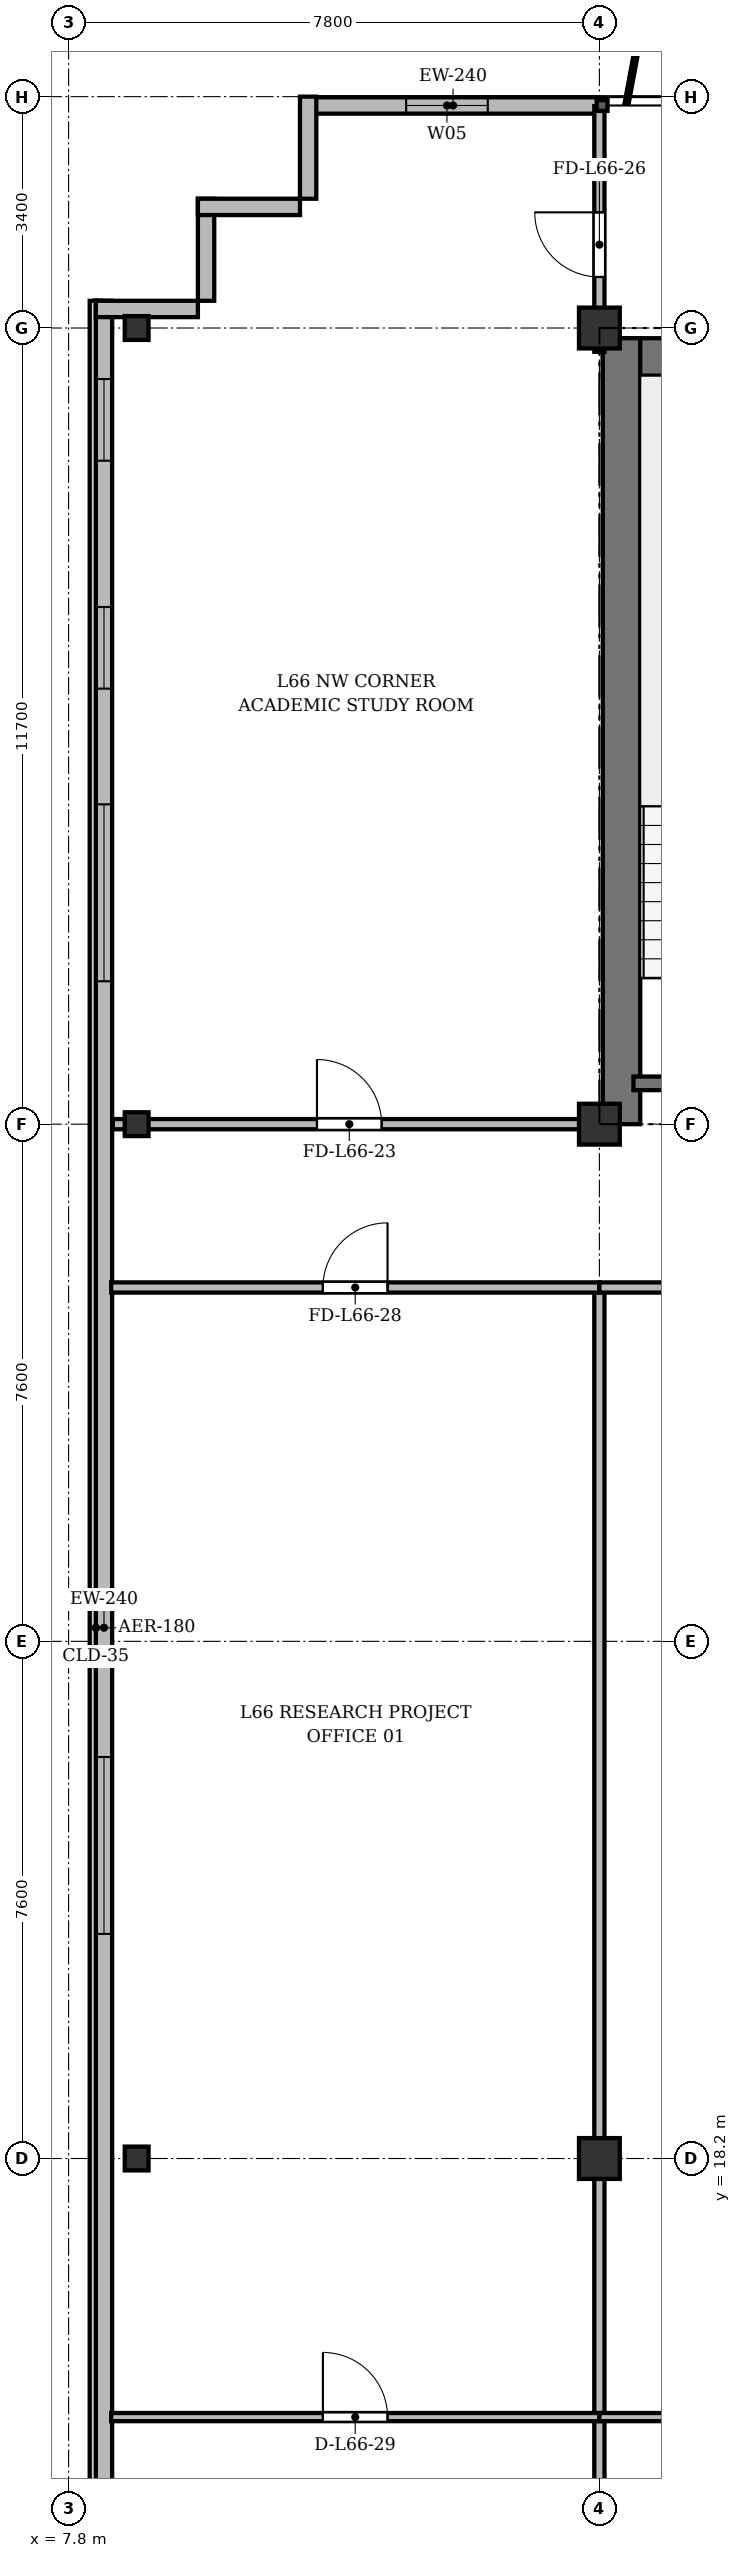
"""IFC4 building model, lengths in metres.
Left out: names, types, materials, properties, quantities, classifications, styles, units other than length and angle.
Written with IfcOpenShell. Run it as: python <this file> out.ifc"""

import sys

from ifc_helpers import new_model, si_unit, direction, frame, frame_2d, origin, origin_2d, place, context, subcontext, project, spatial, rectangle, i_section, extrude, source, transform, mapped, element, fill, save


model = new_model("IFC4")
c1 = context("Model", 3, precision=1e-05, world=origin(), true_north=direction((0.0, 1.0)))
c2 = subcontext(c1, "Body", "Model", "MODEL_VIEW")
j1 = project(units=[si_unit("LENGTHUNIT", "METRE"), si_unit("PLANEANGLEUNIT", "RADIAN")], contexts=[c1])
p1 = place(None, origin())
s1 = spatial("IfcSite", under=j1, at=p1, CompositionType="ELEMENT")
p2 = place(p1, origin())
s2 = spatial("IfcBuilding", under=s1, at=p2, CompositionType="ELEMENT")
p3 = place(p2, frame((0.0, 0.0, 255.9)))
s3 = spatial("IfcBuildingStorey", under=s2, at=p3, CompositionType="ELEMENT", Elevation=255.9)
m1 = source(origin(), c2, "Body", "SweptSolid", [
    extrude(i_section(OverallWidth=0.35, OverallDepth=0.35, WebThickness=0.018, FlangeThickness=0.028, at=origin_2d()), origin(), (0.0, 0.0, 1.0), 3.6),
])
for number, where, z_axis, x_axis in (
    (1, (8.8, 18.2, 0.0), (0.0, 0.0, 1.0), (1.0, 0.0, 0.0)),
    (2, (8.8, 33.4, 0.0), (0.0, 0.0, 1.0), (1.0, 0.0, 0.0)),
    (3, (8.8, 45.1, 0.0), (0.0, 0.0, 1.0), (1.0, 0.0, 0.0)),
):
    element("IfcColumn", number, at=place(p3, frame(where, z_axis=z_axis, x_axis=x_axis)), inside=s3, PredefinedType="COLUMN", context=c2, shape_type="MappedRepresentation", body=[
        mapped(m1, transform((0.0, 0.0, 0.0), x_axis=(1.0, 0.0, 0.0), y_axis=(0.0, 1.0, 0.0), z_axis=(0.0, 0.0, 1.0), scale=1.0)),
    ])
m2 = source(origin(), c2, "Body", "SweptSolid", [
    extrude(rectangle(XDim=0.6, YDim=0.6, at=origin_2d()), origin(), (0.0, 0.0, 1.0), 3.6),
])
for number, where, z_axis, x_axis in (
    (4, (15.6, 18.2, 0.0), (0.0, 0.0, 1.0), (1.0, 0.0, 0.0)),
    (5, (15.6, 33.4, 0.0), (0.0, 0.0, 1.0), (1.0, 0.0, 0.0)),
    (6, (15.6, 45.1, 0.0), (0.0, 0.0, 1.0), (1.0, 0.0, 0.0)),
):
    element("IfcColumn", number, at=place(p3, frame(where, z_axis=z_axis, x_axis=x_axis)), inside=s3, PredefinedType="COLUMN", context=c2, shape_type="MappedRepresentation", body=[
        mapped(m2, transform((0.0, 0.0, 0.0), x_axis=(1.0, 0.0, 0.0), y_axis=(0.0, 1.0, 0.0), z_axis=(0.0, 0.0, 1.0), scale=1.0)),
    ])
p4 = place(p3, frame((11.3, 48.37, 0.0), z_axis=(0.0, 0.0, 1.0), x_axis=(1.0, 0.0, 0.0)))
e7 = element("IfcWall", 7, at=p4, inside=s3, PredefinedType="SOLIDWALL", context=c2, shape_type="SweptSolid", body=[
    extrude(rectangle(XDim=4.3, YDim=0.24, at=frame_2d((2.15, 0.0))), origin(), (0.0, 0.0, 1.0), 3.37),
])
p5 = place(p4, frame((1.46, 0.0, 0.9)))
e8 = element("IfcOpeningElement", 8, at=p5, cuts=e7, PredefinedType="OPENING", context=c2, shape_type="SweptSolid", body=[
    extrude(rectangle(XDim=1.2, YDim=1.65, at=frame_2d((0.6, 0.825))), frame((0.0, 0.13, 0.0), z_axis=(0.0, -1.0, 0.0), x_axis=(1.0, 0.0, 0.0)), (0.0, 0.0, 1.0), 0.26),
])
p6 = place(p3, frame((8.32, 6.5, 0.0), z_axis=(0.0, 0.0, 1.0), x_axis=(0.0, 1.0, 0.0)))
e9 = element("IfcWall", 9, at=p6, inside=s3, PredefinedType="SOLIDWALL", context=c2, shape_type="SweptSolid", body=[
    extrude(rectangle(XDim=39.0, YDim=0.24, at=frame_2d((19.5, 0.0))), origin(), (0.0, 0.0, 1.0), 3.37),
])
p7 = place(p6, frame((1.45, 0.0, 0.92)))
e10 = element("IfcOpeningElement", 10, at=p7, cuts=e9, PredefinedType="OPENING", context=c2, shape_type="SweptSolid", body=[
    extrude(rectangle(XDim=1.2, YDim=1.65, at=frame_2d((0.6, 0.825))), frame((0.0, 0.13, 0.0), z_axis=(0.0, -1.0, 0.0), x_axis=(1.0, 0.0, 0.0)), (0.0, 0.0, 1.0), 0.26),
])
p8 = place(p6, frame((3.6, 0.0, 0.92)))
e11 = element("IfcOpeningElement", 11, at=p8, cuts=e9, PredefinedType="OPENING", context=c2, shape_type="SweptSolid", body=[
    extrude(rectangle(XDim=2.6, YDim=1.9, at=frame_2d((1.3, 0.95))), frame((0.0, 0.13, 0.0), z_axis=(0.0, -1.0, 0.0), x_axis=(1.0, 0.0, 0.0)), (0.0, 0.0, 1.0), 0.26),
])
p9 = place(p6, frame((15.0, 0.0, 0.92)))
e12 = element("IfcOpeningElement", 12, at=p9, cuts=e9, PredefinedType="OPENING", context=c2, shape_type="SweptSolid", body=[
    extrude(rectangle(XDim=2.6, YDim=1.9, at=frame_2d((1.3, 0.95))), frame((0.0, 0.13, 0.0), z_axis=(0.0, -1.0, 0.0), x_axis=(1.0, 0.0, 0.0)), (0.0, 0.0, 1.0), 0.26),
])
p10 = place(p6, frame((29.0, 0.0, 0.92)))
e13 = element("IfcOpeningElement", 13, at=p10, cuts=e9, PredefinedType="OPENING", context=c2, shape_type="SweptSolid", body=[
    extrude(rectangle(XDim=2.6, YDim=1.9, at=frame_2d((1.3, 0.95))), frame((0.0, 0.13, 0.0), z_axis=(0.0, -1.0, 0.0), x_axis=(1.0, 0.0, 0.0)), (0.0, 0.0, 1.0), 0.26),
])
p11 = place(p6, frame((33.3, 0.0, 0.92)))
e14 = element("IfcOpeningElement", 14, at=p11, cuts=e9, PredefinedType="OPENING", context=c2, shape_type="SweptSolid", body=[
    extrude(rectangle(XDim=1.2, YDim=1.65, at=frame_2d((0.6, 0.825))), frame((0.0, 0.13, 0.0), z_axis=(0.0, -1.0, 0.0), x_axis=(1.0, 0.0, 0.0)), (0.0, 0.0, 1.0), 0.26),
])
p12 = place(p6, frame((36.65, 0.0, 0.92)))
e15 = element("IfcOpeningElement", 15, at=p12, cuts=e9, PredefinedType="OPENING", context=c2, shape_type="SweptSolid", body=[
    extrude(rectangle(XDim=1.2, YDim=1.65, at=frame_2d((0.6, 0.825))), frame((0.0, 0.13, 0.0), z_axis=(0.0, -1.0, 0.0), x_axis=(1.0, 0.0, 0.0)), (0.0, 0.0, 1.0), 0.26),
])
for number, where, z_axis, x_axis in (
    (16, (8.2, 45.38, 0.0), (0.0, 0.0, 1.0), (1.0, 0.0, 0.0)),
    (17, (9.82, 45.5, 0.0), (0.0, 0.0, 1.0), (0.0, 1.0, 0.0)),
    (18, (9.7, 46.88, 0.0), (0.0, 0.0, 1.0), (1.0, 0.0, 0.0)),
    (19, (11.32, 47.0, 0.0), (0.0, 0.0, 1.0), (0.0, 1.0, 0.0)),
):
    element("IfcWall", number, at=place(p3, frame(where, z_axis=z_axis, x_axis=x_axis)), inside=s3, PredefinedType="SOLIDWALL", context=c2, shape_type="SweptSolid", body=[
        extrude(rectangle(XDim=1.5, YDim=0.24, at=frame_2d((0.75, 0.0))), origin(), (0.0, 0.0, 1.0), 3.37),
    ])
p13 = place(p3, frame((15.65, 44.675, 0.0), z_axis=(0.0, 0.0, 1.0), x_axis=(1.0, 0.0, 0.0)))
e20 = element("IfcWall", 20, at=p13, inside=s3, PredefinedType="SHEAR", context=c2, shape_type="SweptSolid", body=[
    extrude(rectangle(XDim=43.1, YDim=0.55, at=frame_2d((21.55, 0.0))), origin(), (0.0, 0.0, 1.0), 3.37),
])
p14 = place(p3, frame((15.925, 33.4, 0.0), z_axis=(0.0, 0.0, 1.0), x_axis=(0.0, 1.0, 0.0)))
e21 = element("IfcWall", 21, at=p14, inside=s3, PredefinedType="SHEAR", context=c2, shape_type="SweptSolid", body=[
    extrude(rectangle(XDim=11.55, YDim=0.55, at=frame_2d((5.775, 0.0))), origin(), (0.0, 0.0, 1.0), 3.37),
])
p15 = place(p3, frame((16.1, 34.0, 0.0), z_axis=(0.0, 0.0, 1.0), x_axis=(1.0, 0.0, 0.0)))
e22 = element("IfcWall", 22, at=p15, inside=s3, PredefinedType="SHEAR", context=c2, shape_type="SweptSolid", body=[
    extrude(rectangle(XDim=3.4, YDim=0.2, at=frame_2d((1.7, 0.0))), origin(), (0.0, 0.0, 1.0), 3.37),
])
p16 = place(p3, frame((8.45, 33.4, 0.0), z_axis=(0.0, 0.0, 1.0), x_axis=(1.0, 0.0, 0.0)))
e23 = element("IfcWall", 23, at=p16, inside=s3, PredefinedType="PARTITIONING", context=c2, shape_type="SweptSolid", body=[
    extrude(rectangle(XDim=7.15, YDim=0.15, at=frame_2d((3.575, 0.0))), origin(), (0.0, 0.0, 1.0), 2.92),
])
p17 = place(p16, frame((3.0, 0.0, 0.0)))
e24 = element("IfcOpeningElement", 24, at=p17, cuts=e23, PredefinedType="OPENING", context=c2, shape_type="SweptSolid", body=[
    extrude(rectangle(XDim=0.95, YDim=2.15, at=frame_2d((0.475, 1.075))), frame((0.0, 0.085, 0.0), z_axis=(0.0, -1.0, 0.0), x_axis=(1.0, 0.0, 0.0)), (0.0, 0.0, 1.0), 0.17),
])
p18 = place(p3, frame((15.6, 44.75, 0.0), z_axis=(0.0, 0.0, 1.0), x_axis=(0.0, 1.0, 0.0)))
e25 = element("IfcWall", 25, at=p18, inside=s3, PredefinedType="PARTITIONING", context=c2, shape_type="SweptSolid", body=[
    extrude(rectangle(XDim=3.61, YDim=0.15, at=frame_2d((1.805, 0.0))), origin(), (0.0, 0.0, 1.0), 2.87),
])
p19 = place(p18, frame((1.1, 0.0, 0.0)))
e26 = element("IfcOpeningElement", 26, at=p19, cuts=e25, PredefinedType="OPENING", context=c2, shape_type="SweptSolid", body=[
    extrude(rectangle(XDim=0.95, YDim=2.15, at=frame_2d((0.475, 1.075))), frame((0.0, 0.085, 0.0), z_axis=(0.0, -1.0, 0.0), x_axis=(1.0, 0.0, 0.0)), (0.0, 0.0, 1.0), 0.17),
])
p20 = place(p3, frame((15.6, 3.725, 0.0), z_axis=(0.0, 0.0, 1.0), x_axis=(0.0, 1.0, 0.0)))
e27 = element("IfcWall", 27, at=p20, inside=s3, PredefinedType="PARTITIONING", context=c2, shape_type="SweptSolid", body=[
    extrude(rectangle(XDim=27.275, YDim=0.15, at=frame_2d((13.637, 0.0))), origin(), (0.0, 0.0, 1.0), 2.87),
])
p21 = place(p3, frame((8.425, 31.0, 0.0), z_axis=(0.0, 0.0, 1.0), x_axis=(1.0, 0.0, 0.0)))
e28 = element("IfcWall", 28, at=p21, inside=s3, PredefinedType="PARTITIONING", context=c2, shape_type="SweptSolid", body=[
    extrude(rectangle(XDim=7.175, YDim=0.15, at=frame_2d((3.587, 0.0))), origin(), (0.0, 0.0, 1.0), 2.87),
])
p22 = place(p21, frame((3.112, 0.0, 0.0)))
e29 = element("IfcOpeningElement", 29, at=p22, cuts=e28, PredefinedType="OPENING", context=c2, shape_type="SweptSolid", body=[
    extrude(rectangle(XDim=0.95, YDim=2.15, at=frame_2d((0.475, 1.075))), frame((0.0, 0.085, 0.0), z_axis=(0.0, -1.0, 0.0), x_axis=(1.0, 0.0, 0.0)), (0.0, 0.0, 1.0), 0.17),
])
p23 = place(p3, frame((8.425, 14.4, 0.0), z_axis=(0.0, 0.0, 1.0), x_axis=(1.0, 0.0, 0.0)))
e30 = element("IfcWall", 30, at=p23, inside=s3, PredefinedType="PARTITIONING", context=c2, shape_type="SweptSolid", body=[
    extrude(rectangle(XDim=7.175, YDim=0.12, at=frame_2d((3.587, 0.0))), origin(), (0.0, 0.0, 1.0), 2.87),
])
p24 = place(p23, frame((3.112, 0.0, 0.0)))
e31 = element("IfcOpeningElement", 31, at=p24, cuts=e30, PredefinedType="OPENING", context=c2, shape_type="SweptSolid", body=[
    extrude(rectangle(XDim=0.95, YDim=2.15, at=frame_2d((0.475, 1.075))), frame((0.0, 0.07, 0.0), z_axis=(0.0, -1.0, 0.0), x_axis=(1.0, 0.0, 0.0)), (0.0, 0.0, 1.0), 0.14),
])
p25 = place(p3, frame((15.6, 31.0, 0.0), z_axis=(0.0, 0.0, 1.0), x_axis=(1.0, 0.0, 0.0)))
e32 = element("IfcWall", 32, at=p25, inside=s3, PredefinedType="PARTITIONING", context=c2, shape_type="SweptSolid", body=[
    extrude(rectangle(XDim=7.8, YDim=0.15, at=frame_2d((3.9, 0.0))), origin(), (0.0, 0.0, 1.0), 2.87),
])
p26 = place(p25, frame((3.333, 0.0, 0.0)))
e33 = element("IfcOpeningElement", 33, at=p26, cuts=e32, PredefinedType="OPENING", context=c2, shape_type="SweptSolid", body=[
    extrude(rectangle(XDim=0.95, YDim=2.15, at=frame_2d((0.475, 1.075))), frame((0.0, 0.085, 0.0), z_axis=(0.0, -1.0, 0.0), x_axis=(1.0, 0.0, 0.0)), (0.0, 0.0, 1.0), 0.17),
])
p27 = place(p3, frame((15.6, 14.4, 0.0), z_axis=(0.0, 0.0, 1.0), x_axis=(1.0, 0.0, 0.0)))
e34 = element("IfcWall", 34, at=p27, inside=s3, PredefinedType="PARTITIONING", context=c2, shape_type="SweptSolid", body=[
    extrude(rectangle(XDim=7.8, YDim=0.12, at=frame_2d((3.9, 0.0))), origin(), (0.0, 0.0, 1.0), 2.87),
])
p28 = place(p27, frame((3.333, 0.0, 0.0)))
e35 = element("IfcOpeningElement", 35, at=p28, cuts=e34, PredefinedType="OPENING", context=c2, shape_type="SweptSolid", body=[
    extrude(rectangle(XDim=0.95, YDim=2.15, at=frame_2d((0.475, 1.075))), frame((0.0, 0.07, 0.0), z_axis=(0.0, -1.0, 0.0), x_axis=(1.0, 0.0, 0.0)), (0.0, 0.0, 1.0), 0.14),
])
m3 = source(origin(), c2, "Body", "SweptSolid", [
    extrude(rectangle(XDim=1.2, YDim=1.65, at=frame_2d((0.6, 0.825))), frame((0.0, 0.03, 0.0), z_axis=(0.0, -1.0, 0.0), x_axis=(1.0, 0.0, 0.0)), (0.0, 0.0, 1.0), 0.06),
])
p29 = place(p5, origin())
e36 = element("IfcWindow", 36, at=p29, inside=s3, PartitioningType="SINGLE_PANEL", PredefinedType="WINDOW", context=c2, shape_type="MappedRepresentation", body=[
    mapped(m3, transform((0.0, 0.0, 0.0), x_axis=(1.0, 0.0, 0.0), y_axis=(0.0, 1.0, 0.0), z_axis=(0.0, 0.0, 1.0), scale=1.0)),
])
fill(e8, e36)
m4 = source(origin(), c2, "Body", "SweptSolid", [
    extrude(rectangle(XDim=2.6, YDim=1.9, at=frame_2d((1.3, 0.95))), frame((0.0, 0.03, 0.0), z_axis=(0.0, -1.0, 0.0), x_axis=(1.0, 0.0, 0.0)), (0.0, 0.0, 1.0), 0.06),
])
p30 = place(p9, origin())
e37 = element("IfcWindow", 37, at=p30, inside=s3, PartitioningType="SINGLE_PANEL", PredefinedType="WINDOW", context=c2, shape_type="MappedRepresentation", body=[
    mapped(m4, transform((0.0, 0.0, 0.0), x_axis=(1.0, 0.0, 0.0), y_axis=(0.0, 1.0, 0.0), z_axis=(0.0, 0.0, 1.0), scale=1.0)),
])
fill(e12, e37)
p31 = place(p10, origin())
e38 = element("IfcWindow", 38, at=p31, inside=s3, PartitioningType="SINGLE_PANEL", PredefinedType="WINDOW", context=c2, shape_type="MappedRepresentation", body=[
    mapped(m4, transform((0.0, 0.0, 0.0), x_axis=(1.0, 0.0, 0.0), y_axis=(0.0, 1.0, 0.0), z_axis=(0.0, 0.0, 1.0), scale=1.0)),
])
fill(e13, e38)
p32 = place(p11, origin())
e39 = element("IfcWindow", 39, at=p32, inside=s3, PartitioningType="SINGLE_PANEL", PredefinedType="WINDOW", context=c2, shape_type="MappedRepresentation", body=[
    mapped(m3, transform((0.0, 0.0, 0.0), x_axis=(1.0, 0.0, 0.0), y_axis=(0.0, 1.0, 0.0), z_axis=(0.0, 0.0, 1.0), scale=1.0)),
])
fill(e14, e39)
p33 = place(p12, origin())
e40 = element("IfcWindow", 40, at=p33, inside=s3, PartitioningType="SINGLE_PANEL", PredefinedType="WINDOW", context=c2, shape_type="MappedRepresentation", body=[
    mapped(m3, transform((0.0, 0.0, 0.0), x_axis=(1.0, 0.0, 0.0), y_axis=(0.0, 1.0, 0.0), z_axis=(0.0, 0.0, 1.0), scale=1.0)),
])
fill(e15, e40)
m5 = source(origin(), c2, "Body", "SweptSolid", [
    extrude(rectangle(XDim=0.95, YDim=2.15, at=frame_2d((0.475, 1.075))), frame((0.0, 0.025, 0.0), z_axis=(0.0, -1.0, 0.0), x_axis=(1.0, 0.0, 0.0)), (0.0, 0.0, 1.0), 0.05),
])
p34 = place(p17, origin())
e41 = element("IfcDoor", 41, at=p34, inside=s3, OperationType="SINGLE_SWING_LEFT", PredefinedType="DOOR", context=c2, shape_type="MappedRepresentation", body=[
    mapped(m5, transform((0.0, 0.0, 0.0), x_axis=(1.0, 0.0, 0.0), y_axis=(0.0, 1.0, 0.0), z_axis=(0.0, 0.0, 1.0), scale=1.0)),
])
fill(e24, e41)
p35 = place(p19, origin())
e42 = element("IfcDoor", 42, at=p35, inside=s3, OperationType="SINGLE_SWING_RIGHT", PredefinedType="DOOR", context=c2, shape_type="MappedRepresentation", body=[
    mapped(m5, transform((0.0, 0.0, 0.0), x_axis=(1.0, 0.0, 0.0), y_axis=(0.0, 1.0, 0.0), z_axis=(0.0, 0.0, 1.0), scale=1.0)),
])
fill(e26, e42)
p36 = place(p22, origin())
e43 = element("IfcDoor", 43, at=p36, inside=s3, OperationType="SINGLE_SWING_RIGHT", PredefinedType="DOOR", context=c2, shape_type="MappedRepresentation", body=[
    mapped(m5, transform((0.0, 0.0, 0.0), x_axis=(1.0, 0.0, 0.0), y_axis=(0.0, 1.0, 0.0), z_axis=(0.0, 0.0, 1.0), scale=1.0)),
])
fill(e29, e43)
p37 = place(p24, origin())
e44 = element("IfcDoor", 44, at=p37, inside=s3, OperationType="SINGLE_SWING_LEFT", PredefinedType="DOOR", context=c2, shape_type="MappedRepresentation", body=[
    mapped(m5, transform((0.0, 0.0, 0.0), x_axis=(1.0, 0.0, 0.0), y_axis=(0.0, 1.0, 0.0), z_axis=(0.0, 0.0, 1.0), scale=1.0)),
])
fill(e31, e44)
save(model, sys.argv[1])
